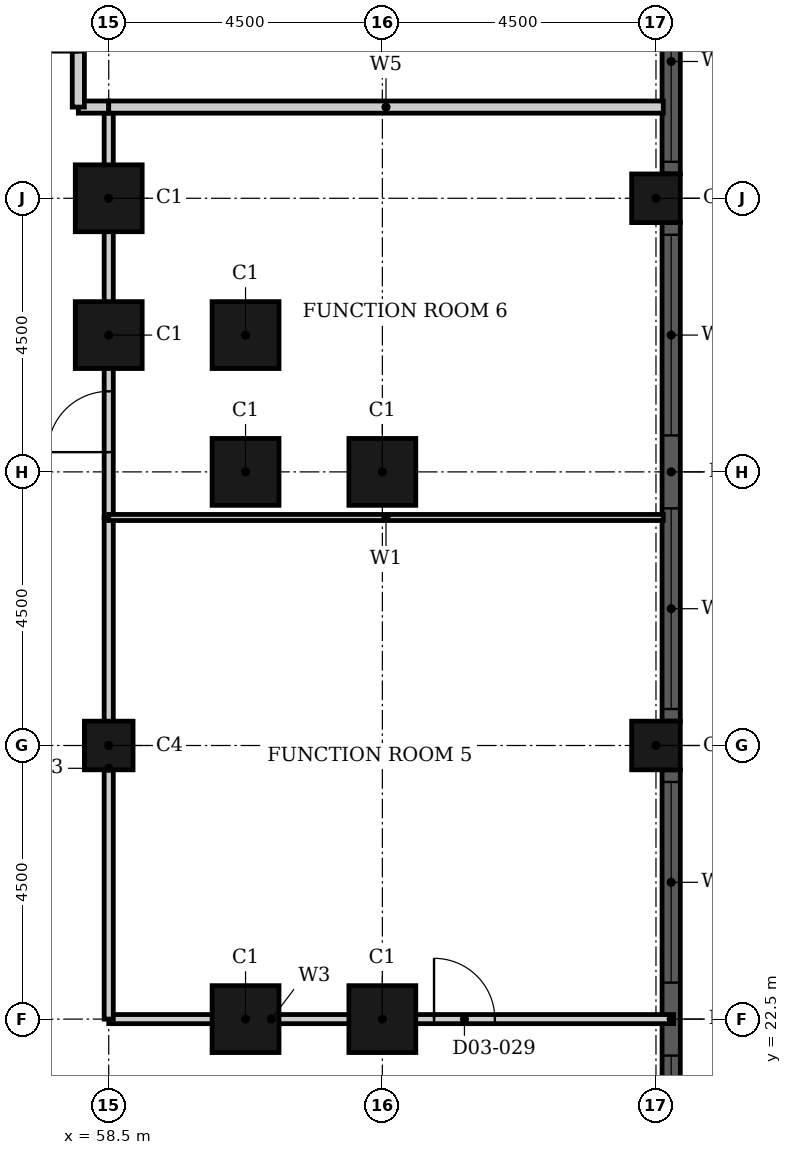
"""IFC4 building model, lengths in metres.
Left out: names, types, materials, properties, quantities, classifications, styles, units other than length and angle.
Written with IfcOpenShell. Run it as: python <this file> out.ifc"""

import sys

from ifc_helpers import new_model, si_unit, direction, frame, frame_2d, origin, origin_2d, place, context, subcontext, project, spatial, rectangle, hollow_rectangle, extrude, element, fill, save


model = new_model("IFC4")
c1 = context("Model", 3, precision=1e-05, world=origin(), true_north=direction((0.0, 1.0)))
c2 = subcontext(c1, "Body", "Model", "MODEL_VIEW")
j1 = project(units=[si_unit("LENGTHUNIT", "METRE"), si_unit("PLANEANGLEUNIT", "RADIAN")], contexts=[c1])
p1 = place(None, origin())
s1 = spatial("IfcSite", under=j1, at=p1, CompositionType="ELEMENT")
p2 = place(p1, origin())
s2 = spatial("IfcBuilding", under=s1, at=p2, CompositionType="ELEMENT")
p3 = place(p2, frame((0.0, 0.0, 17.4)))
s3 = spatial("IfcBuildingStorey", under=s2, at=p3, CompositionType="ELEMENT", Elevation=17.4)
for number, where, z_axis, x_axis in (
    (1, (60.75, 22.5, 0.0), (0.0, 0.0, 1.0), (1.0, 0.0, 0.0)),
    (2, (63.0, 22.5, 0.0), (0.0, 0.0, 1.0), (1.0, 0.0, 0.0)),
    (3, (63.0, 31.5, 0.0), (0.0, 0.0, 1.0), (1.0, 0.0, 0.0)),
    (4, (60.75, 31.5, 0.0), (0.0, 0.0, 1.0), (1.0, 0.0, 0.0)),
    (5, (60.75, 33.75, 0.0), (0.0, 0.0, 1.0), (1.0, 0.0, 0.0)),
    (6, (58.5, 33.75, 0.0), (0.0, 0.0, 1.0), (1.0, 0.0, 0.0)),
    (7, (58.5, 36.0, 0.0), (0.0, 0.0, 1.0), (1.0, 0.0, 0.0)),
):
    element("IfcColumn", number, at=place(p3, frame(where, z_axis=z_axis, x_axis=x_axis)), inside=s3, PredefinedType="COLUMN", context=c2, shape_type="SweptSolid", body=[
        extrude(hollow_rectangle(XDim=1.1, YDim=1.1, WallThickness=0.036, at=origin_2d()), origin(), (0.0, 0.0, 1.0), 6.6),
    ])
for number, where, z_axis, x_axis in (
    (8, (67.5, 27.0, 0.0), (0.0, 0.0, 1.0), (1.0, 0.0, 0.0)),
    (9, (67.5, 36.0, 0.0), (0.0, 0.0, 1.0), (1.0, 0.0, 0.0)),
    (10, (58.5, 27.0, 0.0), (0.0, 0.0, 1.0), (1.0, 0.0, 0.0)),
):
    element("IfcColumn", number, at=place(p3, frame(where, z_axis=z_axis, x_axis=x_axis)), inside=s3, PredefinedType="COLUMN", context=c2, shape_type="SweptSolid", body=[
        extrude(hollow_rectangle(XDim=0.8, YDim=0.8, WallThickness=0.025, at=origin_2d()), origin(), (0.0, 0.0, 1.0), 6.6),
    ])
p4 = place(p3, frame((67.75, 18.4, 0.0), z_axis=(0.0, 0.0, 1.0), x_axis=(0.0, 1.0, 0.0)))
e11 = element("IfcWall", 11, at=p4, inside=s3, PredefinedType="SOLIDWALL", context=c2, shape_type="SweptSolid", body=[
    extrude(rectangle(XDim=8.2, YDim=0.3, at=frame_2d((4.1, 0.0))), origin(), (0.0, 0.0, 1.0), 6.6),
])
p5 = place(p4, frame((0.2, 0.0, 0.9)))
e12 = element("IfcOpeningElement", 12, at=p5, cuts=e11, PredefinedType="OPENING", context=c2, shape_type="SweptSolid", body=[
    extrude(rectangle(XDim=3.3, YDim=3.6, at=frame_2d((1.65, 1.8))), frame((0.0, 0.16, 0.0), z_axis=(0.0, -1.0, 0.0), x_axis=(1.0, 0.0, 0.0)), (0.0, 0.0, 1.0), 0.32),
])
p6 = place(p4, frame((4.7, 0.0, 0.9)))
e13 = element("IfcOpeningElement", 13, at=p6, cuts=e11, PredefinedType="OPENING", context=c2, shape_type="SweptSolid", body=[
    extrude(rectangle(XDim=3.3, YDim=3.6, at=frame_2d((1.65, 1.8))), frame((0.0, 0.16, 0.0), z_axis=(0.0, -1.0, 0.0), x_axis=(1.0, 0.0, 0.0)), (0.0, 0.0, 1.0), 0.32),
])
p7 = place(p3, frame((67.75, 27.4, 0.0), z_axis=(0.0, 0.0, 1.0), x_axis=(0.0, 1.0, 0.0)))
e14 = element("IfcWall", 14, at=p7, inside=s3, PredefinedType="SOLIDWALL", context=c2, shape_type="SweptSolid", body=[
    extrude(rectangle(XDim=8.2, YDim=0.3, at=frame_2d((4.1, 0.0))), origin(), (0.0, 0.0, 1.0), 6.6),
])
p8 = place(p7, frame((0.2, 0.0, 0.9)))
e15 = element("IfcOpeningElement", 15, at=p8, cuts=e14, PredefinedType="OPENING", context=c2, shape_type="SweptSolid", body=[
    extrude(rectangle(XDim=3.3, YDim=3.6, at=frame_2d((1.65, 1.8))), frame((0.0, 0.16, 0.0), z_axis=(0.0, -1.0, 0.0), x_axis=(1.0, 0.0, 0.0)), (0.0, 0.0, 1.0), 0.32),
])
p9 = place(p7, frame((4.7, 0.0, 0.9)))
e16 = element("IfcOpeningElement", 16, at=p9, cuts=e14, PredefinedType="OPENING", context=c2, shape_type="SweptSolid", body=[
    extrude(rectangle(XDim=3.3, YDim=3.6, at=frame_2d((1.65, 1.8))), frame((0.0, 0.16, 0.0), z_axis=(0.0, -1.0, 0.0), x_axis=(1.0, 0.0, 0.0)), (0.0, 0.0, 1.0), 0.32),
])
p10 = place(p3, frame((67.75, 36.4, 0.0), z_axis=(0.0, 0.0, 1.0), x_axis=(0.0, 1.0, 0.0)))
e17 = element("IfcWall", 17, at=p10, inside=s3, PredefinedType="SOLIDWALL", context=c2, shape_type="SweptSolid", body=[
    extrude(rectangle(XDim=8.2, YDim=0.3, at=frame_2d((4.1, 0.0))), origin(), (0.0, 0.0, 1.0), 6.6),
])
p11 = place(p10, frame((0.2, 0.0, 0.9)))
e18 = element("IfcOpeningElement", 18, at=p11, cuts=e17, PredefinedType="OPENING", context=c2, shape_type="SweptSolid", body=[
    extrude(rectangle(XDim=3.3, YDim=3.6, at=frame_2d((1.65, 1.8))), frame((0.0, 0.16, 0.0), z_axis=(0.0, -1.0, 0.0), x_axis=(1.0, 0.0, 0.0)), (0.0, 0.0, 1.0), 0.32),
])
p12 = place(p10, frame((4.7, 0.0, 0.9)))
e19 = element("IfcOpeningElement", 19, at=p12, cuts=e17, PredefinedType="OPENING", context=c2, shape_type="SweptSolid", body=[
    extrude(rectangle(XDim=3.3, YDim=3.6, at=frame_2d((1.65, 1.8))), frame((0.0, 0.16, 0.0), z_axis=(0.0, -1.0, 0.0), x_axis=(1.0, 0.0, 0.0)), (0.0, 0.0, 1.0), 0.32),
])
p13 = place(p3, frame((58.5, 22.5, 0.0), z_axis=(0.0, 0.0, 1.0), x_axis=(1.0, 0.0, 0.0)))
e20 = element("IfcWall", 20, at=p13, inside=s3, PredefinedType="PARTITIONING", context=c2, shape_type="SweptSolid", body=[
    extrude(rectangle(XDim=9.29, YDim=0.15, at=frame_2d((4.645, 0.0))), origin(), (0.0, 0.0, 1.0), 6.25),
])
p14 = place(p13, frame((5.35, 0.0, 0.0)))
e21 = element("IfcOpeningElement", 21, at=p14, cuts=e20, PredefinedType="OPENING", context=c2, shape_type="SweptSolid", body=[
    extrude(rectangle(XDim=1.0, YDim=2.1, at=frame_2d((0.5, 1.05))), frame((0.0, 0.085, 0.0), z_axis=(0.0, -1.0, 0.0), x_axis=(1.0, 0.0, 0.0)), (0.0, 0.0, 1.0), 0.17),
])
p15 = place(p3, frame((58.5, 22.5, 0.0), z_axis=(0.0, 0.0, 1.0), x_axis=(0.0, 1.0, 0.0)))
e22 = element("IfcWall", 22, at=p15, inside=s3, PredefinedType="PARTITIONING", context=c2, shape_type="SweptSolid", body=[
    extrude(rectangle(XDim=8.25, YDim=0.15, at=frame_2d((4.125, 0.0))), origin(), (0.0, 0.0, 1.0), 6.25),
])
p16 = place(p3, frame((58.5, 30.75, 0.0), z_axis=(0.0, 0.0, 1.0), x_axis=(0.0, 1.0, 0.0)))
e23 = element("IfcWall", 23, at=p16, inside=s3, PredefinedType="PARTITIONING", context=c2, shape_type="SweptSolid", body=[
    extrude(rectangle(XDim=6.75, YDim=0.15, at=frame_2d((3.375, 0.0))), origin(), (0.0, 0.0, 1.0), 6.25),
])
p17 = place(p16, frame((1.075, 0.0, 0.0)))
e24 = element("IfcOpeningElement", 24, at=p17, cuts=e23, PredefinedType="OPENING", context=c2, shape_type="SweptSolid", body=[
    extrude(rectangle(XDim=1.0, YDim=2.1, at=frame_2d((0.5, 1.05))), frame((0.0, 0.085, 0.0), z_axis=(0.0, -1.0, 0.0), x_axis=(1.0, 0.0, 0.0)), (0.0, 0.0, 1.0), 0.17),
])
p18 = place(p3, frame((58.5, 30.75, 0.0), z_axis=(0.0, 0.0, 1.0), x_axis=(1.0, 0.0, 0.0)))
e25 = element("IfcWall", 25, at=p18, inside=s3, PredefinedType="PARTITIONING", context=c2, shape_type="SweptSolid", body=[
    extrude(rectangle(XDim=9.12, YDim=0.1, at=frame_2d((4.56, 0.0))), origin(), (0.0, 0.0, 1.0), 6.25),
])
p19 = place(p3, frame((58.0, 37.5, 0.0), z_axis=(0.0, 0.0, 1.0), x_axis=(1.0, 0.0, 0.0)))
e26 = element("IfcWall", 26, at=p19, inside=s3, PredefinedType="PARTITIONING", context=c2, shape_type="SweptSolid", body=[
    extrude(rectangle(XDim=0.5, YDim=0.2, at=frame_2d((0.25, 0.0))), origin(), (0.0, 0.0, 1.0), 6.25),
])
p20 = place(p3, frame((58.5, 37.5, 0.0), z_axis=(0.0, 0.0, 1.0), x_axis=(1.0, 0.0, 0.0)))
e27 = element("IfcWall", 27, at=p20, inside=s3, PredefinedType="PARTITIONING", context=c2, shape_type="SweptSolid", body=[
    extrude(rectangle(XDim=9.12, YDim=0.2, at=frame_2d((4.56, 0.0))), origin(), (0.0, 0.0, 1.0), 6.25),
])
p21 = place(p3, frame((58.0, 37.5, 0.0), z_axis=(0.0, 0.0, 1.0), x_axis=(0.0, 1.0, 0.0)))
e28 = element("IfcWall", 28, at=p21, inside=s3, PredefinedType="PARTITIONING", context=c2, shape_type="SweptSolid", body=[
    extrude(rectangle(XDim=3.0, YDim=0.2, at=frame_2d((1.5, 0.0))), origin(), (0.0, 0.0, 1.0), 6.25),
])
p22 = place(p21, frame((0.9, 0.0, 0.0)))
e29 = element("IfcOpeningElement", 29, at=p22, cuts=e28, PredefinedType="OPENING", context=c2, shape_type="SweptSolid", body=[
    extrude(rectangle(XDim=1.2, YDim=2.1, at=frame_2d((0.6, 1.05))), frame((0.0, 0.11, 0.0), z_axis=(0.0, -1.0, 0.0), x_axis=(1.0, 0.0, 0.0)), (0.0, 0.0, 1.0), 0.22),
])
p23 = place(p5, origin())
e30 = element("IfcWindow", 30, at=p23, inside=s3, PartitioningType="SINGLE_PANEL", PredefinedType="WINDOW", context=c2, shape_type="SweptSolid", body=[
    extrude(rectangle(XDim=3.3, YDim=3.6, at=frame_2d((1.65, 1.8))), frame((0.0, 0.03, 0.0), z_axis=(0.0, -1.0, 0.0), x_axis=(1.0, 0.0, 0.0)), (0.0, 0.0, 1.0), 0.06),
])
fill(e12, e30)
p24 = place(p6, origin())
e31 = element("IfcWindow", 31, at=p24, inside=s3, PartitioningType="SINGLE_PANEL", PredefinedType="WINDOW", context=c2, shape_type="SweptSolid", body=[
    extrude(rectangle(XDim=3.3, YDim=3.6, at=frame_2d((1.65, 1.8))), frame((0.0, 0.03, 0.0), z_axis=(0.0, -1.0, 0.0), x_axis=(1.0, 0.0, 0.0)), (0.0, 0.0, 1.0), 0.06),
])
fill(e13, e31)
p25 = place(p8, origin())
e32 = element("IfcWindow", 32, at=p25, inside=s3, PartitioningType="SINGLE_PANEL", PredefinedType="WINDOW", context=c2, shape_type="SweptSolid", body=[
    extrude(rectangle(XDim=3.3, YDim=3.6, at=frame_2d((1.65, 1.8))), frame((0.0, 0.03, 0.0), z_axis=(0.0, -1.0, 0.0), x_axis=(1.0, 0.0, 0.0)), (0.0, 0.0, 1.0), 0.06),
])
fill(e15, e32)
p26 = place(p9, origin())
e33 = element("IfcWindow", 33, at=p26, inside=s3, PartitioningType="SINGLE_PANEL", PredefinedType="WINDOW", context=c2, shape_type="SweptSolid", body=[
    extrude(rectangle(XDim=3.3, YDim=3.6, at=frame_2d((1.65, 1.8))), frame((0.0, 0.03, 0.0), z_axis=(0.0, -1.0, 0.0), x_axis=(1.0, 0.0, 0.0)), (0.0, 0.0, 1.0), 0.06),
])
fill(e16, e33)
p27 = place(p11, origin())
e34 = element("IfcWindow", 34, at=p27, inside=s3, PartitioningType="SINGLE_PANEL", PredefinedType="WINDOW", context=c2, shape_type="SweptSolid", body=[
    extrude(rectangle(XDim=3.3, YDim=3.6, at=frame_2d((1.65, 1.8))), frame((0.0, 0.03, 0.0), z_axis=(0.0, -1.0, 0.0), x_axis=(1.0, 0.0, 0.0)), (0.0, 0.0, 1.0), 0.06),
])
fill(e18, e34)
p28 = place(p14, origin())
e35 = element("IfcDoor", 35, at=p28, inside=s3, OperationType="SINGLE_SWING_RIGHT", PredefinedType="DOOR", context=c2, shape_type="SweptSolid", body=[
    extrude(rectangle(XDim=1.0, YDim=2.1, at=frame_2d((0.5, 1.05))), frame((0.0, 0.025, 0.0), z_axis=(0.0, -1.0, 0.0), x_axis=(1.0, 0.0, 0.0)), (0.0, 0.0, 1.0), 0.05),
])
fill(e21, e35)
p29 = place(p17, origin())
e36 = element("IfcDoor", 36, at=p29, inside=s3, OperationType="SINGLE_SWING_LEFT", PredefinedType="DOOR", context=c2, shape_type="SweptSolid", body=[
    extrude(rectangle(XDim=1.0, YDim=2.1, at=frame_2d((0.5, 1.05))), frame((0.0, 0.025, 0.0), z_axis=(0.0, -1.0, 0.0), x_axis=(1.0, 0.0, 0.0)), (0.0, 0.0, 1.0), 0.05),
])
fill(e24, e36)
save(model, sys.argv[1])
